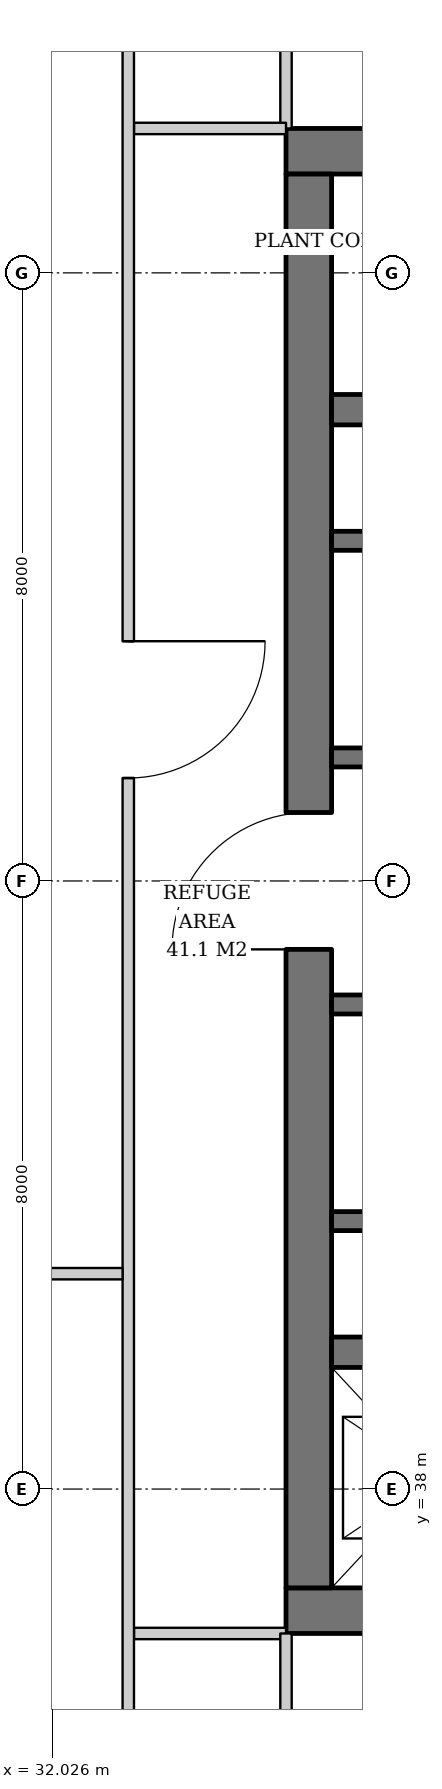
"""IFC4 building model, lengths in metres.
Left out: names, types, materials, properties, quantities, classifications, styles, units other than length and angle.
Written with IfcOpenShell. Run it as: python <this file> out.ifc"""

import sys

from ifc_helpers import new_model, si_unit, direction, frame, frame_2d, origin, place, context, subcontext, project, spatial, rectangle, extrude, element, fill, save


model = new_model("IFC4")
c1 = context("Model", 3, precision=1e-05, world=origin(), true_north=direction((0.0, 1.0)))
c2 = subcontext(c1, "Body", "Model", "MODEL_VIEW")
j1 = project(units=[si_unit("LENGTHUNIT", "METRE"), si_unit("PLANEANGLEUNIT", "RADIAN")], contexts=[c1])
p1 = place(None, origin())
s1 = spatial("IfcSite", under=j1, at=p1, CompositionType="ELEMENT")
p2 = place(p1, origin())
s2 = spatial("IfcBuilding", under=s1, at=p2, CompositionType="ELEMENT")
p3 = place(p2, frame((0.0, 0.0, 230.0)))
s3 = spatial("IfcBuildingStorey", under=s2, at=p3, CompositionType="ELEMENT", Elevation=230.0)
p4 = place(p3, frame((35.1, 36.4, 0.0), z_axis=(0.0, 0.0, 1.0), x_axis=(1.0, 0.0, 0.0)))
e1 = element("IfcWall", 1, at=p4, inside=s3, PredefinedType="SHEAR", context=c2, shape_type="SweptSolid", body=[
    extrude(rectangle(XDim=19.8, YDim=0.6, at=frame_2d((9.9, 0.0))), origin(), (0.0, 0.0, 1.0), 3.8),
])
p5 = place(p4, frame((3.9, 0.0, 0.0)))
e2 = element("IfcOpeningElement", 2, at=p5, cuts=e1, PredefinedType="OPENING", context=c2, shape_type="SweptSolid", body=[
    extrude(rectangle(XDim=1.0, YDim=2.1, at=frame_2d((0.5, 1.05))), frame((0.0, 0.31, 0.0), z_axis=(0.0, -1.0, 0.0), x_axis=(1.0, 0.0, 0.0)), (0.0, 0.0, 1.0), 0.62),
])
p6 = place(p4, frame((15.35, 0.0, 0.0)))
e3 = element("IfcOpeningElement", 3, at=p6, cuts=e1, PredefinedType="OPENING", context=c2, shape_type="SweptSolid", body=[
    extrude(rectangle(XDim=1.0, YDim=2.1, at=frame_2d((0.5, 1.05))), frame((0.0, 0.31, 0.0), z_axis=(0.0, -1.0, 0.0), x_axis=(1.0, 0.0, 0.0)), (0.0, 0.0, 1.0), 0.62),
])
p7 = place(p3, frame((35.1, 55.6, 0.0), z_axis=(0.0, 0.0, 1.0), x_axis=(1.0, 0.0, 0.0)))
e4 = element("IfcWall", 4, at=p7, inside=s3, PredefinedType="SHEAR", context=c2, shape_type="SweptSolid", body=[
    extrude(rectangle(XDim=19.8, YDim=0.6, at=frame_2d((9.9, 0.0))), origin(), (0.0, 0.0, 1.0), 3.8),
])
p8 = place(p7, frame((14.54, 0.0, 0.0)))
e5 = element("IfcOpeningElement", 5, at=p8, cuts=e4, PredefinedType="OPENING", context=c2, shape_type="SweptSolid", body=[
    extrude(rectangle(XDim=1.0, YDim=2.1, at=frame_2d((0.5, 1.05))), frame((0.0, 0.31, 0.0), z_axis=(0.0, -1.0, 0.0), x_axis=(1.0, 0.0, 0.0)), (0.0, 0.0, 1.0), 0.62),
])
p9 = place(p7, frame((1.675, 0.0, 0.0)))
e6 = element("IfcOpeningElement", 6, at=p9, cuts=e4, PredefinedType="OPENING", context=c2, shape_type="SweptSolid", body=[
    extrude(rectangle(XDim=1.0, YDim=2.1, at=frame_2d((0.5, 1.05))), frame((0.0, 0.31, 0.0), z_axis=(0.0, -1.0, 0.0), x_axis=(1.0, 0.0, 0.0)), (0.0, 0.0, 1.0), 0.62),
])
p10 = place(p7, frame((3.587, 0.0, 0.0)))
e7 = element("IfcOpeningElement", 7, at=p10, cuts=e4, PredefinedType="OPENING", context=c2, shape_type="SweptSolid", body=[
    extrude(rectangle(XDim=1.0, YDim=2.1, at=frame_2d((0.5, 1.05))), frame((0.0, 0.31, 0.0), z_axis=(0.0, -1.0, 0.0), x_axis=(1.0, 0.0, 0.0)), (0.0, 0.0, 1.0), 0.62),
])
p11 = place(p3, frame((35.4, 36.7, 0.0), z_axis=(0.0, 0.0, 1.0), x_axis=(0.0, 1.0, 0.0)))
e8 = element("IfcWall", 8, at=p11, inside=s3, PredefinedType="SHEAR", context=c2, shape_type="SweptSolid", body=[
    extrude(rectangle(XDim=18.6, YDim=0.6, at=frame_2d((9.3, 0.0))), origin(), (0.0, 0.0, 1.0), 3.8),
])
p12 = place(p11, frame((8.4, 0.0, 0.0)))
e9 = element("IfcOpeningElement", 9, at=p12, cuts=e8, PredefinedType="OPENING", context=c2, shape_type="SweptSolid", body=[
    extrude(rectangle(XDim=1.8, YDim=2.4, at=frame_2d((0.9, 1.2))), frame((0.0, 0.31, 0.0), z_axis=(0.0, -1.0, 0.0), x_axis=(1.0, 0.0, 0.0)), (0.0, 0.0, 1.0), 0.62),
])
p13 = place(p3, frame((35.7, 39.8, 0.0), z_axis=(0.0, 0.0, 1.0), x_axis=(1.0, 0.0, 0.0)))
e10 = element("IfcWall", 10, at=p13, inside=s3, PredefinedType="SHEAR", context=c2, shape_type="SweptSolid", body=[
    extrude(rectangle(XDim=18.6, YDim=0.4, at=frame_2d((9.3, 0.0))), origin(), (0.0, 0.0, 1.0), 3.8),
])
p14 = place(p13, frame((3.3, 0.0, 0.0)))
e11 = element("IfcOpeningElement", 11, at=p14, cuts=e10, PredefinedType="OPENING", context=c2, shape_type="SweptSolid", body=[
    extrude(rectangle(XDim=1.0, YDim=2.1, at=frame_2d((0.5, 1.05))), frame((0.0, 0.21, 0.0), z_axis=(0.0, -1.0, 0.0), x_axis=(1.0, 0.0, 0.0)), (0.0, 0.0, 1.0), 0.42),
])
p15 = place(p3, frame((35.7, 52.2, 0.0), z_axis=(0.0, 0.0, 1.0), x_axis=(1.0, 0.0, 0.0)))
e12 = element("IfcWall", 12, at=p15, inside=s3, PredefinedType="SHEAR", context=c2, shape_type="SweptSolid", body=[
    extrude(rectangle(XDim=18.6, YDim=0.4, at=frame_2d((9.3, 0.0))), origin(), (0.0, 0.0, 1.0), 3.8),
])
p16 = place(p15, frame((11.33, 0.0, 0.0)))
e13 = element("IfcOpeningElement", 13, at=p16, cuts=e12, PredefinedType="OPENING", context=c2, shape_type="SweptSolid", body=[
    extrude(rectangle(XDim=1.0, YDim=2.1, at=frame_2d((0.5, 1.05))), frame((0.0, 0.21, 0.0), z_axis=(0.0, -1.0, 0.0), x_axis=(1.0, 0.0, 0.0)), (0.0, 0.0, 1.0), 0.42),
])
p17 = place(p3, frame((35.7, 50.475, 0.0), z_axis=(0.0, 0.0, 1.0), x_axis=(1.0, 0.0, 0.0)))
e14 = element("IfcWall", 14, at=p17, inside=s3, PredefinedType="SHEAR", context=c2, shape_type="SweptSolid", body=[
    extrude(rectangle(XDim=11.0, YDim=0.25, at=frame_2d((5.5, 0.0))), origin(), (0.0, 0.0, 1.0), 3.8),
])
p18 = place(p3, frame((35.7, 47.625, 0.0), z_axis=(0.0, 0.0, 1.0), x_axis=(1.0, 0.0, 0.0)))
e15 = element("IfcWall", 15, at=p18, inside=s3, PredefinedType="SHEAR", context=c2, shape_type="SweptSolid", body=[
    extrude(rectangle(XDim=12.83, YDim=0.25, at=frame_2d((6.415, 0.0))), origin(), (0.0, 0.0, 1.0), 3.8),
])
p19 = place(p18, frame((9.0, 0.0, 0.0)))
e16 = element("IfcOpeningElement", 16, at=p19, cuts=e15, PredefinedType="OPENING", context=c2, shape_type="SweptSolid", body=[
    extrude(rectangle(XDim=1.0, YDim=2.1, at=frame_2d((0.5, 1.05))), frame((0.0, 0.135, 0.0), z_axis=(0.0, -1.0, 0.0), x_axis=(1.0, 0.0, 0.0)), (0.0, 0.0, 1.0), 0.27),
])
p20 = place(p18, frame((11.415, 0.0, 0.0)))
e17 = element("IfcOpeningElement", 17, at=p20, cuts=e15, PredefinedType="OPENING", context=c2, shape_type="SweptSolid", body=[
    extrude(rectangle(XDim=1.0, YDim=2.1, at=frame_2d((0.5, 1.05))), frame((0.0, 0.135, 0.0), z_axis=(0.0, -1.0, 0.0), x_axis=(1.0, 0.0, 0.0)), (0.0, 0.0, 1.0), 0.27),
])
p21 = place(p3, frame((35.7, 41.525, 0.0), z_axis=(0.0, 0.0, 1.0), x_axis=(1.0, 0.0, 0.0)))
e18 = element("IfcWall", 18, at=p21, inside=s3, PredefinedType="SHEAR", context=c2, shape_type="SweptSolid", body=[
    extrude(rectangle(XDim=11.0, YDim=0.25, at=frame_2d((5.5, 0.0))), origin(), (0.0, 0.0, 1.0), 3.8),
])
p22 = place(p3, frame((35.7, 44.375, 0.0), z_axis=(0.0, 0.0, 1.0), x_axis=(1.0, 0.0, 0.0)))
e19 = element("IfcWall", 19, at=p22, inside=s3, PredefinedType="SHEAR", context=c2, shape_type="SweptSolid", body=[
    extrude(rectangle(XDim=12.83, YDim=0.25, at=frame_2d((6.415, 0.0))), origin(), (0.0, 0.0, 1.0), 3.8),
])
p23 = place(p22, frame((9.0, 0.0, 0.0)))
e20 = element("IfcOpeningElement", 20, at=p23, cuts=e19, PredefinedType="OPENING", context=c2, shape_type="SweptSolid", body=[
    extrude(rectangle(XDim=1.0, YDim=2.1, at=frame_2d((0.5, 1.05))), frame((0.0, 0.135, 0.0), z_axis=(0.0, -1.0, 0.0), x_axis=(1.0, 0.0, 0.0)), (0.0, 0.0, 1.0), 0.27),
])
p24 = place(p22, frame((11.415, 0.0, 0.0)))
e21 = element("IfcOpeningElement", 21, at=p24, cuts=e19, PredefinedType="OPENING", context=c2, shape_type="SweptSolid", body=[
    extrude(rectangle(XDim=1.0, YDim=2.1, at=frame_2d((0.5, 1.05))), frame((0.0, 0.135, 0.0), z_axis=(0.0, -1.0, 0.0), x_axis=(1.0, 0.0, 0.0)), (0.0, 0.0, 1.0), 0.27),
])
for number, where, z_axis, x_axis in (
    (22, (35.1, 55.9, 0.0), (0.0, 0.0, 1.0), (0.0, 1.0, 0.0)),
    (23, (35.1, 36.1, 0.0), (0.0, 0.0, 1.0), (-1.0, 0.0, 0.0)),
    (24, (35.1, 55.9, 0.0), (0.0, 0.0, 1.0), (-1.0, 0.0, 0.0)),
):
    element("IfcWall", number, at=place(p3, frame(where, z_axis=z_axis, x_axis=x_axis)), inside=s3, PredefinedType="PARTITIONING", context=c2, shape_type="SweptSolid", body=[
        extrude(rectangle(XDim=2.0, YDim=0.15, at=frame_2d((1.0, 0.0))), origin(), (0.0, 0.0, 1.0), 3.6),
    ])
p25 = place(p3, frame((33.025, 58.736, 0.0), z_axis=(0.0, 0.0, 1.0), x_axis=(0.0, -1.0, 0.0)))
e25 = element("IfcWall", 25, at=p25, inside=s3, PredefinedType="PARTITIONING", context=c2, shape_type="SweptSolid", body=[
    extrude(rectangle(XDim=24.636, YDim=0.15, at=frame_2d((12.318, 0.0))), origin(), (0.0, 0.0, 1.0), 3.0),
])
p26 = place(p25, frame((9.582, 0.0, 0.0)))
e26 = element("IfcOpeningElement", 26, at=p26, cuts=e25, PredefinedType="OPENING", context=c2, shape_type="SweptSolid", body=[
    extrude(rectangle(XDim=1.8, YDim=2.4, at=frame_2d((0.9, 1.2))), frame((0.0, 0.085, 0.0), z_axis=(0.0, -1.0, 0.0), x_axis=(1.0, 0.0, 0.0)), (0.0, 0.0, 1.0), 0.17),
])
p27 = place(p3, frame((32.95, 40.833, 0.0), z_axis=(0.0, 0.0, 1.0), x_axis=(-1.0, 0.0, 0.0)))
e27 = element("IfcWall", 27, at=p27, inside=s3, PredefinedType="PARTITIONING", context=c2, shape_type="SweptSolid", body=[
    extrude(rectangle(XDim=4.584, YDim=0.15, at=frame_2d((2.292, 0.0))), origin(), (0.0, 0.0, 1.0), 3.6),
])
p28 = place(p3, frame((35.1, 36.1, 0.0), z_axis=(0.0, 0.0, 1.0), x_axis=(0.0, -1.0, 0.0)))
e28 = element("IfcWall", 28, at=p28, inside=s3, PredefinedType="PARTITIONING", context=c2, shape_type="SweptSolid", body=[
    extrude(rectangle(XDim=2.0, YDim=0.15, at=frame_2d((1.0, 0.0))), origin(), (0.0, 0.0, 1.0), 3.6),
])
p29 = place(p12, origin())
e29 = element("IfcDoor", 29, at=p29, inside=s3, OperationType="DOUBLE_DOOR_SINGLE_SWING", PredefinedType="DOOR", context=c2, shape_type="SweptSolid", body=[
    extrude(rectangle(XDim=1.8, YDim=2.4, at=frame_2d((0.9, 1.2))), frame((0.0, 0.025, 0.0), z_axis=(0.0, -1.0, 0.0), x_axis=(1.0, 0.0, 0.0)), (0.0, 0.0, 1.0), 0.05),
])
fill(e9, e29)
p30 = place(p26, origin())
e30 = element("IfcDoor", 30, at=p30, inside=s3, OperationType="DOUBLE_DOOR_SINGLE_SWING", PredefinedType="DOOR", context=c2, shape_type="SweptSolid", body=[
    extrude(rectangle(XDim=1.8, YDim=2.4, at=frame_2d((0.9, 1.2))), frame((0.0, 0.025, 0.0), z_axis=(0.0, -1.0, 0.0), x_axis=(1.0, 0.0, 0.0)), (0.0, 0.0, 1.0), 0.05),
])
fill(e26, e30)
save(model, sys.argv[1])
